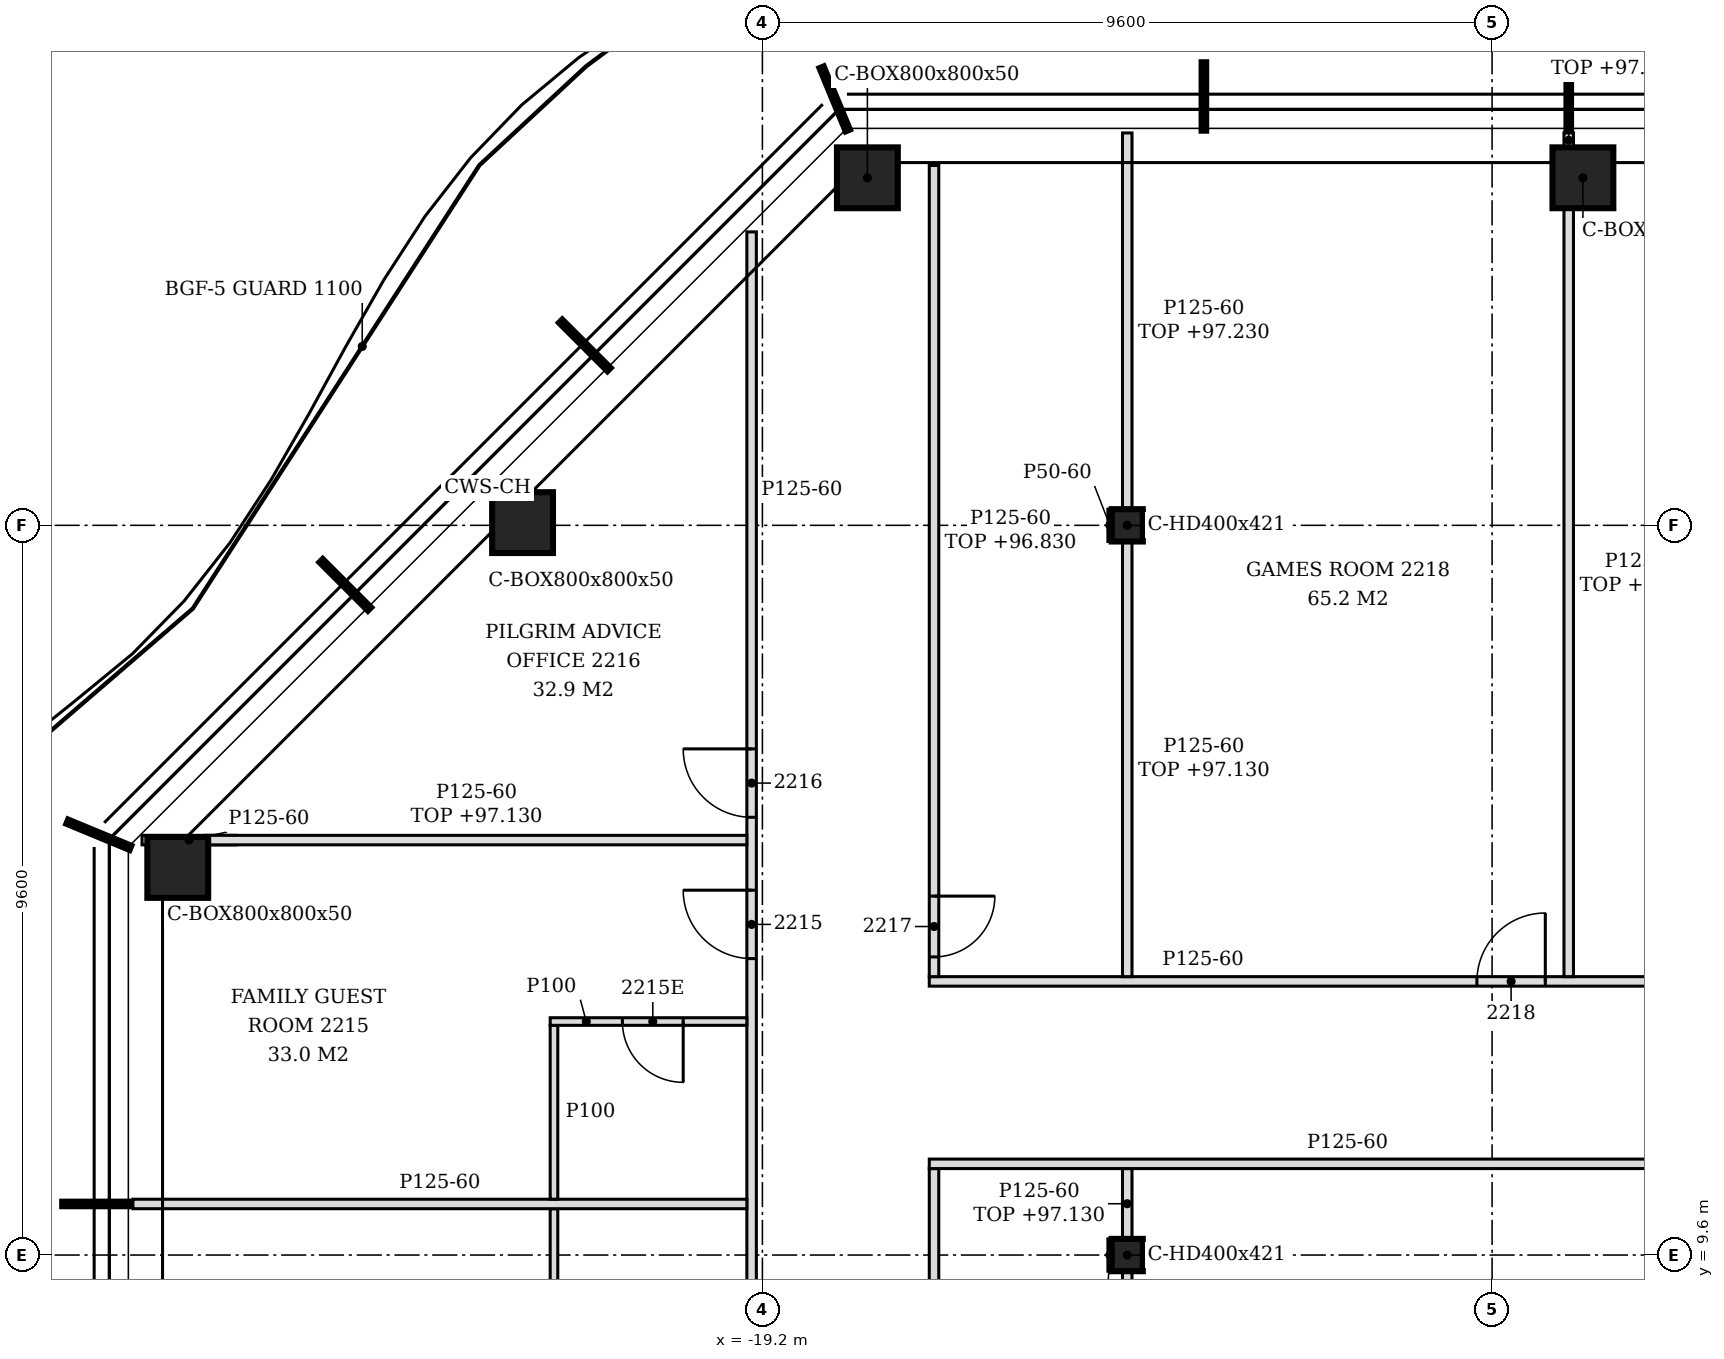
"""IFC4 building model, lengths in metres.
Left out: names, types, materials, properties, quantities, classifications, styles, units other than length and angle.
Written with IfcOpenShell. Run it as: python <this file> out.ifc"""

import sys

from ifc_helpers import new_model, si_unit, direction, frame, frame_2d, origin, origin_2d, place, context, subcontext, project, spatial, polyline, rectangle, hollow_rectangle, i_section, outline, extrude, clip, halfspace, element, fill, save


model = new_model("IFC4")
c1 = context("Model", 3, precision=1e-05, world=origin(), true_north=direction((0.0, 1.0)))
c2 = subcontext(c1, "Body", "Model", "MODEL_VIEW")
j1 = project(units=[si_unit("LENGTHUNIT", "METRE"), si_unit("PLANEANGLEUNIT", "RADIAN")], contexts=[c1])
p1 = place(None, origin())
s1 = spatial("IfcSite", under=j1, at=p1, CompositionType="ELEMENT")
p2 = place(p1, origin())
s2 = spatial("IfcBuilding", under=s1, at=p2, CompositionType="ELEMENT")
p3 = place(p2, frame((0.0, 0.0, 94.2)))
s3 = spatial("IfcBuildingStorey", under=s2, at=p3, CompositionType="ELEMENT", Elevation=94.2)
for number, where, z_axis, x_axis in (
    (1, (-8.405, 23.772, -0.15), (0.282, 0.188, 0.941), (-0.555, 0.832, 0.0)),
    (2, (-17.819, 23.772, -0.15), (0.282, 0.188, 0.941), (-0.555, 0.832, 0.0)),
    (3, (-22.355, 19.236, -0.15), (0.282, 0.188, 0.941), (-0.555, 0.832, 0.0)),
    (4, (-26.892, 14.699, -0.15), (0.282, 0.188, 0.941), (-0.555, 0.832, 0.0)),
):
    element("IfcColumn", number, at=place(p3, frame(where, z_axis=z_axis, x_axis=x_axis)), inside=s3, PredefinedType="COLUMN", context=c2, shape_type="Clipping", body=[
        clip(clip(extrude(hollow_rectangle(XDim=0.8, YDim=0.8, WallThickness=0.05, at=origin_2d()), origin(), (0.0, 0.0, 1.0), 3.826), halfspace(frame((0.0, 0.0, 0.024), z_axis=(0.0, 0.0, 1.0), x_axis=(1.0, 0.0, 0.0)), True)), halfspace(frame((0.0, 0.0, 3.802), z_axis=(0.0, 0.0, 1.0), x_axis=(1.0, 0.0, 0.0)), False)),
    ])
for number, where, z_axis, x_axis in (
    (5, (-14.4, 9.6, -0.15), (0.0, 0.0, 1.0), (1.0, 0.0, 0.0)),
    (6, (-14.4, 19.2, -0.15), (0.0, 0.0, 1.0), (1.0, 0.0, 0.0)),
):
    element("IfcColumn", number, at=place(p3, frame(where, z_axis=z_axis, x_axis=x_axis)), inside=s3, PredefinedType="COLUMN", context=c2, shape_type="SweptSolid", body=[
        extrude(i_section(OverallWidth=0.409, OverallDepth=0.425, WebThickness=0.033, FlangeThickness=0.052, FilletRadius=0.015, at=origin_2d()), origin(), (0.0, 0.0, 1.0), 3.6),
    ])
p4 = place(p3, frame((-19.342, -14.815, 0.0), z_axis=(0.0, 0.0, 1.0), x_axis=(0.0, 1.0, 0.0)))
e7 = element("IfcWall", 7, at=p4, inside=s3, PredefinedType="PARTITIONING", context=c2, shape_type="SweptSolid", body=[
    extrude(outline(polyline([(0.0, 0.0), (37.876, 0.0), (37.876, 3.45), (37.262, 3.45), (37.26, 2.63), (36.147, 2.63), (36.146, 3.45), (35.502, 3.45), (35.5, 2.98), (35.312, 2.98), (35.31, 3.45), (30.712, 3.45), (30.71, 2.88), (30.502, 2.88), (30.5, 3.45), (25.912, 3.45), (25.91, 2.88), (25.702, 2.88), (25.7, 3.45), (21.112, 3.45), (21.11, 2.88), (20.902, 2.88), (20.9, 3.45), (16.312, 3.45), (16.31, 2.88), (16.102, 2.88), (16.1, 3.45), (11.512, 3.45), (11.51, 2.88), (11.302, 2.88), (11.3, 3.45), (6.712, 3.45), (6.71, 2.88), (6.502, 2.88), (6.5, 3.45), (1.912, 3.45), (1.91, 2.88), (1.702, 2.88), (1.7, 3.45), (0.0, 3.45), (0.0, 0.0)])), frame((0.0, 0.062, 0.0), z_axis=(0.0, -1.0, 0.0), x_axis=(1.0, 0.0, 0.0)), (0.0, 0.0, 1.0), 0.125),
])
p5 = place(p4, frame((1.137, 0.0, 0.0)))
e8 = element("IfcOpeningElement", 8, at=p5, cuts=e7, PredefinedType="OPENING", context=c2, shape_type="SweptSolid", body=[
    extrude(rectangle(XDim=0.9, YDim=2.1, at=frame_2d((0.45, 1.05))), frame((0.0, 0.073, 0.0), z_axis=(0.0, -1.0, 0.0), x_axis=(1.0, 0.0, 0.0)), (0.0, 0.0, 1.0), 0.145),
])
p6 = place(p4, frame((7.488, 0.0, 0.0)))
e9 = element("IfcOpeningElement", 9, at=p6, cuts=e7, PredefinedType="OPENING", context=c2, shape_type="SweptSolid", body=[
    extrude(rectangle(XDim=0.9, YDim=2.1, at=frame_2d((0.45, 1.05))), frame((0.0, 0.073, 0.0), z_axis=(0.0, -1.0, 0.0), x_axis=(1.0, 0.0, 0.0)), (0.0, 0.0, 1.0), 0.145),
])
p7 = place(p4, frame((11.471, 0.0, 0.0)))
e10 = element("IfcOpeningElement", 10, at=p7, cuts=e7, PredefinedType="OPENING", context=c2, shape_type="SweptSolid", body=[
    extrude(rectangle(XDim=0.9, YDim=2.1, at=frame_2d((0.45, 1.05))), frame((0.0, 0.073, 0.0), z_axis=(0.0, -1.0, 0.0), x_axis=(1.0, 0.0, 0.0)), (0.0, 0.0, 1.0), 0.145),
])
p8 = place(p4, frame((15.988, 0.0, 0.0)))
e11 = element("IfcOpeningElement", 11, at=p8, cuts=e7, PredefinedType="OPENING", context=c2, shape_type="SweptSolid", body=[
    extrude(rectangle(XDim=0.9, YDim=2.1, at=frame_2d((0.45, 1.05))), frame((0.0, 0.073, 0.0), z_axis=(0.0, -1.0, 0.0), x_axis=(1.0, 0.0, 0.0)), (0.0, 0.0, 1.0), 0.145),
])
p9 = place(p4, frame((20.823, 0.0, 0.0)))
e12 = element("IfcOpeningElement", 12, at=p9, cuts=e7, PredefinedType="OPENING", context=c2, shape_type="SweptSolid", body=[
    extrude(rectangle(XDim=0.9, YDim=2.1, at=frame_2d((0.45, 1.05))), frame((0.0, 0.073, 0.0), z_axis=(0.0, -1.0, 0.0), x_axis=(1.0, 0.0, 0.0)), (0.0, 0.0, 1.0), 0.145),
])
p10 = place(p4, frame((28.315, 0.0, 0.0)))
e13 = element("IfcOpeningElement", 13, at=p10, cuts=e7, PredefinedType="OPENING", context=c2, shape_type="SweptSolid", body=[
    extrude(rectangle(XDim=0.9, YDim=2.1, at=frame_2d((0.45, 1.05))), frame((0.0, 0.073, 0.0), z_axis=(0.0, -1.0, 0.0), x_axis=(1.0, 0.0, 0.0)), (0.0, 0.0, 1.0), 0.145),
])
p11 = place(p4, frame((30.175, 0.0, 0.0)))
e14 = element("IfcOpeningElement", 14, at=p11, cuts=e7, PredefinedType="OPENING", context=c2, shape_type="SweptSolid", body=[
    extrude(rectangle(XDim=0.9, YDim=2.1, at=frame_2d((0.45, 1.05))), frame((0.0, 0.073, 0.0), z_axis=(0.0, -1.0, 0.0), x_axis=(1.0, 0.0, 0.0)), (0.0, 0.0, 1.0), 0.145),
])
p12 = place(p3, frame((-16.942, 2.462, 0.0), z_axis=(0.0, 0.0, 1.0), x_axis=(0.0, 1.0, 0.0)))
e15 = element("IfcWall", 15, at=p12, inside=s3, PredefinedType="PARTITIONING", context=c2, shape_type="SweptSolid", body=[
    extrude(outline(polyline([(0.0, 0.0), (8.275, 0.0), (8.275, 3.45), (3.834, 3.45), (3.832, 2.88), (3.624, 2.88), (3.622, 3.45), (0.0, 3.45), (0.0, 0.0)])), frame((0.0, 0.062, 0.0), z_axis=(0.0, -1.0, 0.0), x_axis=(1.0, 0.0, 0.0)), (0.0, 0.0, 1.0), 0.125),
])
p13 = place(p12, frame((0.738, 0.0, 0.0)))
e16 = element("IfcOpeningElement", 16, at=p13, cuts=e15, PredefinedType="OPENING", context=c2, shape_type="SweptSolid", body=[
    extrude(rectangle(XDim=0.8, YDim=2.1, at=frame_2d((0.4, 1.05))), frame((0.0, 0.073, 0.0), z_axis=(0.0, -1.0, 0.0), x_axis=(1.0, 0.0, 0.0)), (0.0, 0.0, 1.0), 0.145),
])
p14 = place(p3, frame((-14.4, 2.462, 0.0), z_axis=(0.0, 0.0, 1.0), x_axis=(0.0, 1.0, 0.0)))
e17 = element("IfcWall", 17, at=p14, inside=s3, PredefinedType="PARTITIONING", context=c2, shape_type="SweptSolid", body=[
    extrude(rectangle(XDim=6.925, YDim=0.125, at=frame_2d((3.462, 0.0))), origin(), (0.0, 0.0, 1.0), 2.93),
])
p15 = place(p3, frame((-21.942, 7.922, 0.0), z_axis=(0.0, 0.0, 1.0), x_axis=(0.0, 1.0, 0.0)))
e18 = element("IfcWall", 18, at=p15, inside=s3, PredefinedType="PARTITIONING", context=c2, shape_type="SweptSolid", body=[
    extrude(rectangle(XDim=2.287, YDim=0.1, at=frame_2d((1.144, 0.0))), origin(), (0.0, 0.0, 1.0), 3.45),
])
p16 = place(p3, frame((-14.4, 9.812, 0.0), z_axis=(0.0, 0.0, 1.0), x_axis=(0.0, 1.0, 0.0)))
e19 = element("IfcWall", 19, at=p16, inside=s3, PredefinedType="PARTITIONING", context=c2, shape_type="SweptSolid", body=[
    extrude(rectangle(XDim=0.925, YDim=0.125, at=frame_2d((0.462, 0.0))), origin(), (0.0, 0.0, 1.0), 2.93),
])
p17 = place(p3, frame((-27.482, 10.272, 0.0), z_axis=(0.0, 0.0, 1.0), x_axis=(1.0, 0.0, 0.0)))
e20 = element("IfcWall", 20, at=p17, inside=s3, PredefinedType="PARTITIONING", context=c2, shape_type="SweptSolid", body=[
    extrude(outline(polyline([(0.0, 0.0), (8.077, 0.0), (8.077, 3.45), (1.819, 3.45), (1.817, 2.93), (1.519, 2.93), (1.517, 3.45), (0.0, 3.45), (0.0, 0.0)])), frame((0.0, 0.062, 0.0), z_axis=(0.0, -1.0, 0.0), x_axis=(1.0, 0.0, 0.0)), (0.0, 0.0, 1.0), 0.125),
])
p18 = place(p3, frame((-21.942, 10.334, 0.0), z_axis=(0.0, 0.0, 1.0), x_axis=(0.0, 1.0, 0.0)))
e21 = element("IfcWall", 21, at=p18, inside=s3, PredefinedType="PARTITIONING", context=c2, shape_type="SweptSolid", body=[
    extrude(outline(polyline([(0.0, 0.0), (2.288, 0.0), (2.288, 3.45), (0.762, 3.45), (0.76, 2.88), (0.552, 2.88), (0.55, 3.45), (0.0, 3.45), (0.0, 0.0)])), frame((0.0, 0.05, 0.0), z_axis=(0.0, -1.0, 0.0), x_axis=(1.0, 0.0, 0.0)), (0.0, 0.0, 1.0), 0.1),
])
p19 = place(p3, frame((-17.004, 10.8, 0.0), z_axis=(0.0, 0.0, 1.0), x_axis=(1.0, 0.0, 0.0)))
e22 = element("IfcWall", 22, at=p19, inside=s3, PredefinedType="PARTITIONING", context=c2, shape_type="SweptSolid", body=[
    extrude(outline(polyline([(0.0, 0.0), (12.267, 0.0), (12.267, 2.83), (12.054, 2.83), (12.052, 3.45), (2.754, 3.45), (2.752, 2.93), (2.455, 2.93), (2.452, 3.45), (0.0, 3.45), (0.0, 0.0)])), frame((0.0, 0.062, 0.0), z_axis=(0.0, -1.0, 0.0), x_axis=(1.0, 0.0, 0.0)), (0.0, 0.0, 1.0), 0.125),
])
p20 = place(p19, frame((11.004, 0.0, 0.0)))
e23 = element("IfcOpeningElement", 23, at=p20, cuts=e22, PredefinedType="OPENING", context=c2, shape_type="SweptSolid", body=[
    extrude(rectangle(XDim=0.9, YDim=2.1, at=frame_2d((0.45, 1.05))), frame((0.0, 0.073, 0.0), z_axis=(0.0, -1.0, 0.0), x_axis=(1.0, 0.0, 0.0)), (0.0, 0.0, 1.0), 0.145),
])
p21 = place(p3, frame((-21.992, 12.672, 0.0), z_axis=(0.0, 0.0, 1.0), x_axis=(1.0, 0.0, 0.0)))
e24 = element("IfcWall", 24, at=p21, inside=s3, PredefinedType="PARTITIONING", context=c2, shape_type="SweptSolid", body=[
    extrude(rectangle(XDim=2.587, YDim=0.1, at=frame_2d((1.294, 0.0))), origin(), (0.0, 0.0, 1.0), 3.45),
])
p22 = place(p21, frame((0.95, 0.0, 0.0)))
e25 = element("IfcOpeningElement", 25, at=p22, cuts=e24, PredefinedType="OPENING", context=c2, shape_type="SweptSolid", body=[
    extrude(rectangle(XDim=0.8, YDim=2.1, at=frame_2d((0.4, 1.05))), frame((0.0, 0.06, 0.0), z_axis=(0.0, -1.0, 0.0), x_axis=(1.0, 0.0, 0.0)), (0.0, 0.0, 1.0), 0.12),
])
p23 = place(p3, frame((-17.004, 13.2, 0.0), z_axis=(0.0, 0.0, 1.0), x_axis=(1.0, 0.0, 0.0)))
e26 = element("IfcWall", 26, at=p23, inside=s3, PredefinedType="PARTITIONING", context=c2, shape_type="SweptSolid", body=[
    extrude(outline(polyline([(0.0, 0.0), (12.0, 0.0), (12.0, 3.45), (2.754, 3.45), (2.752, 2.93), (2.455, 2.93), (2.452, 3.45), (0.0, 3.45), (0.0, 0.0)])), frame((0.0, 0.062, 0.0), z_axis=(0.0, -1.0, 0.0), x_axis=(1.0, 0.0, 0.0)), (0.0, 0.0, 1.0), 0.125),
])
p24 = place(p23, frame((7.205, 0.0, 0.0)))
e27 = element("IfcOpeningElement", 27, at=p24, cuts=e26, PredefinedType="OPENING", context=c2, shape_type="SweptSolid", body=[
    extrude(rectangle(XDim=0.9, YDim=2.1, at=frame_2d((0.45, 1.05))), frame((0.0, 0.073, 0.0), z_axis=(0.0, -1.0, 0.0), x_axis=(1.0, 0.0, 0.0)), (0.0, 0.0, 1.0), 0.145),
])
p25 = place(p3, frame((-16.942, 13.262, 0.0), z_axis=(0.0, 0.0, 1.0), x_axis=(0.0, 1.0, 0.0)))
e28 = element("IfcWall", 28, at=p25, inside=s3, PredefinedType="PARTITIONING", context=c2, shape_type="SweptSolid", body=[
    extrude(outline(polyline([(0.0, 0.0), (10.572, 0.0), (10.572, 0.863), (10.572, 1.725), (10.572, 2.588), (10.577, 2.63), (0.0, 2.63), (0.0, 2.588), (0.0, 1.725), (0.0, 0.863), (0.0, 0.0)])), frame((0.0, 0.062, 0.0), z_axis=(0.0, -1.0, 0.0), x_axis=(1.0, 0.0, 0.0)), (0.0, 0.0, 1.0), 0.125),
])
p26 = place(p25, frame((0.26, 0.0, 0.0)))
e29 = element("IfcOpeningElement", 29, at=p26, cuts=e28, PredefinedType="OPENING", context=c2, shape_type="SweptSolid", body=[
    extrude(rectangle(XDim=0.8, YDim=2.1, at=frame_2d((0.4, 1.05))), frame((0.0, 0.073, 0.0), z_axis=(0.0, -1.0, 0.0), x_axis=(1.0, 0.0, 0.0)), (0.0, 0.0, 1.0), 0.145),
])
p27 = place(p3, frame((-14.4, 13.262, 0.0), z_axis=(0.0, 0.0, 1.0), x_axis=(0.0, 1.0, 0.0)))
e30 = element("IfcWall", 30, at=p27, inside=s3, PredefinedType="PARTITIONING", context=c2, shape_type="SweptSolid", body=[
    extrude(rectangle(XDim=5.725, YDim=0.125, at=frame_2d((2.863, 0.0))), origin(), (0.0, 0.0, 1.0), 2.93),
])
p28 = place(p3, frame((-8.592, 13.262, 0.0), z_axis=(0.0, 0.0, 1.0), x_axis=(0.0, 1.0, 0.0)))
e31 = element("IfcWall", 31, at=p28, inside=s3, PredefinedType="PARTITIONING", context=c2, shape_type="SweptSolid", body=[
    extrude(outline(polyline([(0.0, 0.0), (10.027, 0.0), (10.587, 0.863), (10.587, 1.725), (10.587, 2.588), (10.587, 2.93), (0.0, 2.93), (0.0, 2.588), (0.0, 1.725), (0.0, 0.863), (0.0, 0.0)])), frame((0.0, 0.062, 0.0), z_axis=(0.0, -1.0, 0.0), x_axis=(1.0, 0.0, 0.0)), (0.0, 0.0, 1.0), 0.125),
])
p29 = place(p3, frame((-27.362, 15.059, 0.0), z_axis=(0.0, 0.0, 1.0), x_axis=(1.0, 0.0, 0.0)))
e32 = element("IfcWall", 32, at=p29, inside=s3, PredefinedType="PARTITIONING", context=c2, shape_type="SweptSolid", body=[
    extrude(outline(polyline([(0.0, 0.0), (0.195, 0.0), (0.198, 0.863), (0.49, 1.725), (0.863, 2.588), (1.236, 3.45), (0.0, 3.45), (0.0, 2.588), (0.0, 1.725), (0.0, 0.863), (0.0, 0.0)])), frame((0.0, 0.062, 0.0), z_axis=(0.0, -1.0, 0.0), x_axis=(1.0, 0.0, 0.0)), (0.0, 0.0, 1.0), 0.125),
])
p30 = place(p3, frame((-26.514, 15.059, 0.0), z_axis=(0.0, 0.0, 1.0), x_axis=(1.0, 0.0, 0.0)))
e33 = element("IfcWall", 33, at=p30, inside=s3, PredefinedType="PARTITIONING", context=c2, shape_type="SweptSolid", body=[
    extrude(outline(polyline([(0.0, 0.0), (7.109, 0.0), (7.109, 0.863), (7.109, 1.725), (7.109, 2.588), (7.109, 2.93), (0.976, 2.93), (0.976, 2.588), (0.747, 1.725), (0.373, 0.863), (0.0, 0.0)])), frame((0.0, 0.062, 0.0), z_axis=(0.0, -1.0, 0.0), x_axis=(1.0, 0.0, 0.0)), (0.0, 0.0, 1.0), 0.125),
])
p31 = place(p3, frame((-14.4, 19.413, 0.0), z_axis=(0.0, 0.0, 1.0), x_axis=(0.0, 1.0, 0.0)))
e34 = element("IfcWall", 34, at=p31, inside=s3, PredefinedType="PARTITIONING", context=c2, shape_type="SweptSolid", body=[
    extrude(outline(polyline([(0.0, 0.0), (4.95, 0.0), (4.95, 2.93), (4.929, 2.93), (4.927, 3.03), (0.0, 3.03), (0.0, 0.0)])), frame((0.0, 0.062, 0.0), z_axis=(0.0, -1.0, 0.0), x_axis=(1.0, 0.0, 0.0)), (0.0, 0.0, 1.0), 0.125),
])
p32 = place(p3, frame((-8.592, 24.17, 0.0), z_axis=(0.0, 0.0, 1.0), x_axis=(0.0, 1.0, 0.0)))
e35 = element("IfcWall", 35, at=p32, inside=s3, PredefinedType="PARTITIONING", context=c2, shape_type="SweptSolid", body=[
    extrude(outline(polyline([(0.0, 0.0), (0.192, 0.0), (0.192, 0.863), (0.192, 1.725), (0.192, 2.588), (0.192, 2.93), (0.0, 2.93), (0.0, 2.588), (0.0, 1.725), (0.0, 0.863), (0.0, 0.0)])), frame((0.0, 0.062, 0.0), z_axis=(0.0, -1.0, 0.0), x_axis=(1.0, 0.0, 0.0)), (0.0, 0.0, 1.0), 0.125),
])
for number, where, z_axis, x_axis in (
    (36, (-14.629, 9.387, 0.0), (0.0, 0.0, 1.0), (0.0, 1.0, 0.0)),
    (37, (-14.629, 18.988, 0.0), (0.0, 0.0, 1.0), (0.0, 1.0, 0.0)),
):
    element("IfcWall", number, at=place(p3, frame(where, z_axis=z_axis, x_axis=x_axis)), inside=s3, PredefinedType="PARTITIONING", context=c2, shape_type="SweptSolid", body=[
        extrude(rectangle(XDim=0.425, YDim=0.05, at=frame_2d((0.212, 0.0))), origin(), (0.0, 0.0, 1.0), 3.45),
    ])
p33 = place(p10, origin())
e38 = element("IfcDoor", 38, at=p33, inside=s3, OperationType="SINGLE_SWING_RIGHT", PredefinedType="DOOR", context=c2, shape_type="SweptSolid", body=[
    extrude(rectangle(XDim=0.9, YDim=2.1, at=frame_2d((0.45, 1.05))), frame((0.0, 0.025, 0.0), z_axis=(0.0, -1.0, 0.0), x_axis=(1.0, 0.0, 0.0)), (0.0, 0.0, 1.0), 0.05),
])
fill(e13, e38)
p34 = place(p22, frame((0.8, 0.0, 0.0), z_axis=(0.0, 0.0, 1.0), x_axis=(-1.0, 0.0, 0.0)))
e39 = element("IfcDoor", 39, at=p34, inside=s3, OperationType="SINGLE_SWING_LEFT", PredefinedType="DOOR", context=c2, shape_type="SweptSolid", body=[
    extrude(rectangle(XDim=0.8, YDim=2.1, at=frame_2d((0.4, 1.05))), frame((0.0, 0.025, 0.0), z_axis=(0.0, -1.0, 0.0), x_axis=(1.0, 0.0, 0.0)), (0.0, 0.0, 1.0), 0.05),
])
fill(e25, e39)
p35 = place(p11, origin())
e40 = element("IfcDoor", 40, at=p35, inside=s3, OperationType="SINGLE_SWING_RIGHT", PredefinedType="DOOR", context=c2, shape_type="SweptSolid", body=[
    extrude(rectangle(XDim=0.9, YDim=2.1, at=frame_2d((0.45, 1.05))), frame((0.0, 0.025, 0.0), z_axis=(0.0, -1.0, 0.0), x_axis=(1.0, 0.0, 0.0)), (0.0, 0.0, 1.0), 0.05),
])
fill(e14, e40)
p36 = place(p26, frame((0.8, 0.0, 0.0), z_axis=(0.0, 0.0, 1.0), x_axis=(-1.0, 0.0, 0.0)))
e41 = element("IfcDoor", 41, at=p36, inside=s3, OperationType="SINGLE_SWING_LEFT", PredefinedType="DOOR", context=c2, shape_type="SweptSolid", body=[
    extrude(rectangle(XDim=0.8, YDim=2.1, at=frame_2d((0.4, 1.05))), frame((0.0, 0.025, 0.0), z_axis=(0.0, -1.0, 0.0), x_axis=(1.0, 0.0, 0.0)), (0.0, 0.0, 1.0), 0.05),
])
fill(e29, e41)
p37 = place(p24, origin())
e42 = element("IfcDoor", 42, at=p37, inside=s3, OperationType="SINGLE_SWING_RIGHT", PredefinedType="DOOR", context=c2, shape_type="SweptSolid", body=[
    extrude(rectangle(XDim=0.9, YDim=2.1, at=frame_2d((0.45, 1.05))), frame((0.0, 0.025, 0.0), z_axis=(0.0, -1.0, 0.0), x_axis=(1.0, 0.0, 0.0)), (0.0, 0.0, 1.0), 0.05),
])
fill(e27, e42)
save(model, sys.argv[1])
